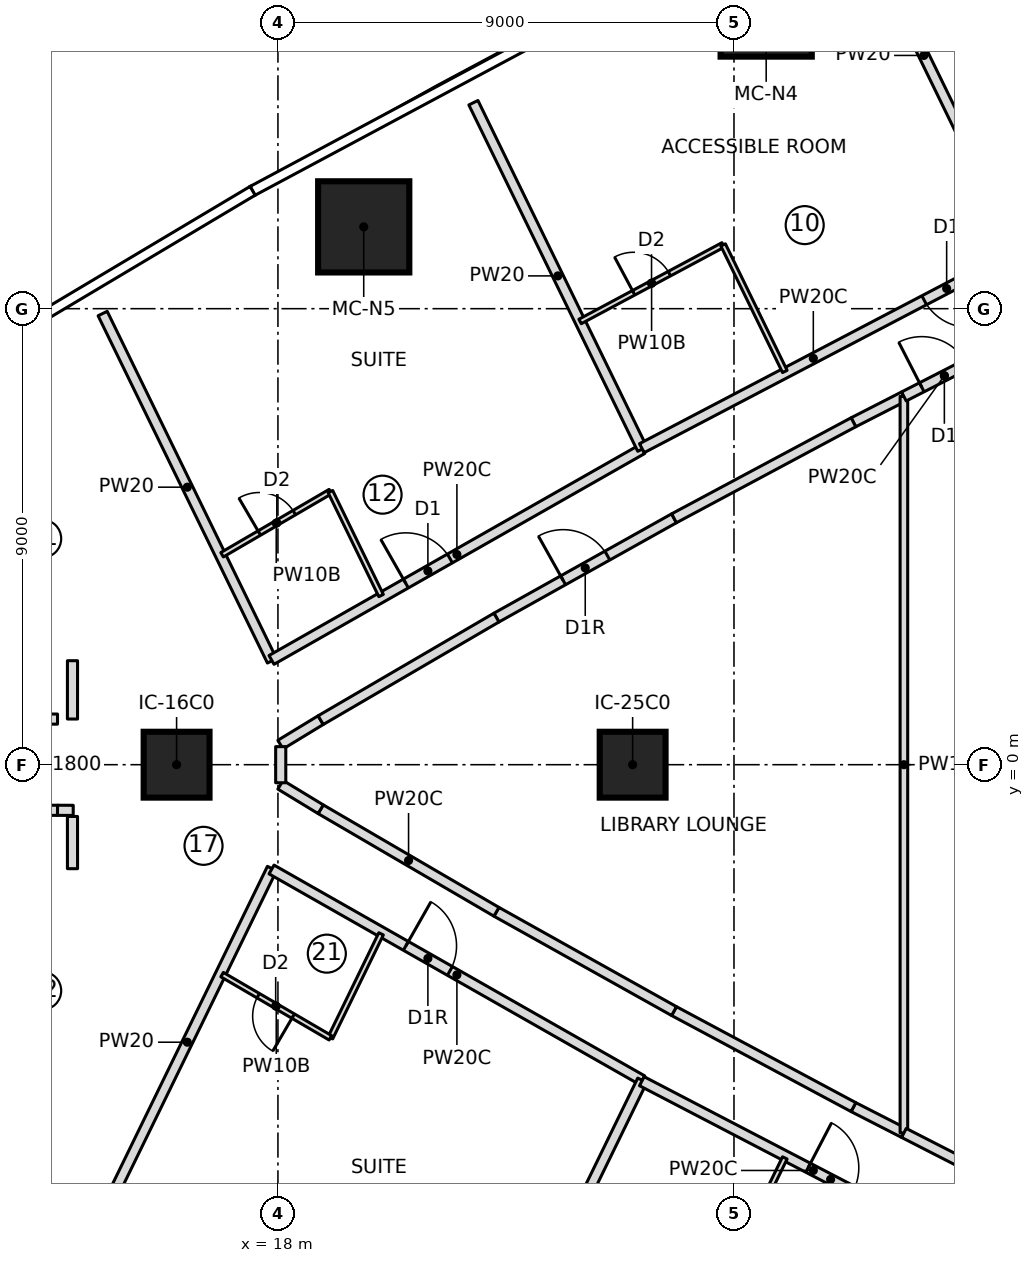
"""IFC4 building model, lengths in metres.
Left out: names, types, materials, properties, quantities, classifications, styles, units other than length and angle.
Written with IfcOpenShell. Run it as: python <this file> out.ifc"""

import sys

from ifc_helpers import new_model, si_unit, direction, frame, frame_2d, origin, origin_2d, place, context, subcontext, project, spatial, rectangle, extrude, element, fill, save


model = new_model("IFC4")
c1 = context("Model", 3, precision=1e-05, world=origin(), true_north=direction((0.0, 1.0)))
c2 = subcontext(c1, "Body", "Model", "MODEL_VIEW")
j1 = project(units=[si_unit("LENGTHUNIT", "METRE"), si_unit("PLANEANGLEUNIT", "RADIAN")], contexts=[c1])
p1 = place(None, origin())
s1 = spatial("IfcSite", under=j1, at=p1, CompositionType="ELEMENT")
p2 = place(p1, origin())
s2 = spatial("IfcBuilding", under=s1, at=p2, CompositionType="ELEMENT")
p3 = place(p2, frame((0.0, 0.0, 53.8)))
s3 = spatial("IfcBuildingStorey", under=s2, at=p3, CompositionType="ELEMENT", Elevation=53.8)
for number, where, z_axis, x_axis in (
    (1, (27.635, 14.874, 0.0), (0.0, 0.0, 1.0), (1.0, 0.0, 0.0)),
    (2, (19.693, 10.615, 0.0), (0.0, 0.0, 1.0), (1.0, 0.0, 0.0)),
):
    element("IfcColumn", number, at=place(p3, frame(where, z_axis=z_axis, x_axis=x_axis)), inside=s3, PredefinedType="COLUMN", context=c2, shape_type="SweptSolid", body=[
        extrude(rectangle(XDim=1.8, YDim=1.8, at=origin_2d()), origin(), (0.0, 0.0, 1.0), 3.55),
    ])
for number, where, z_axis, x_axis in (
    (3, (16.0, 0.0, 0.0), (0.0, 0.0, 1.0), (1.0, 0.0, 0.0)),
    (4, (25.0, 0.0, 0.0), (0.0, 0.0, 1.0), (1.0, 0.0, 0.0)),
):
    element("IfcColumn", number, at=place(p3, frame(where, z_axis=z_axis, x_axis=x_axis)), inside=s3, PredefinedType="COLUMN", context=c2, shape_type="SweptSolid", body=[
        extrude(rectangle(XDim=1.3, YDim=1.3, at=origin_2d()), origin(), (0.0, 0.0, 1.0), 3.55),
    ])
p4 = place(p3, frame((17.882, 2.05, 0.0), z_axis=(0.0, 0.0, 1.0), x_axis=(-0.438213564788, 0.898870887078, 0.0)))
e5 = element("IfcWall", 5, at=p4, inside=s3, PredefinedType="PARTITIONING", context=c2, shape_type="SweptSolid", body=[
    extrude(rectangle(XDim=7.625, YDim=0.2, at=frame_2d((3.813, 0.0))), origin(), (0.0, 0.0, 1.0), 3.25),
])
p5 = place(p3, frame((17.874, 2.068, 0.0), z_axis=(0.0, 0.0, 1.0), x_axis=(0.869280098963, 0.494319845391, 0.0)))
e6 = element("IfcWall", 6, at=p5, inside=s3, PredefinedType="PARTITIONING", context=c2, shape_type="SweptSolid", body=[
    extrude(rectangle(XDim=8.417, YDim=0.2, at=frame_2d((4.208, 0.0))), origin(), (0.0, 0.0, 1.0), 3.25),
])
p6 = place(p5, frame((3.05, 0.0, 0.0)))
e7 = element("IfcOpeningElement", 7, at=p6, cuts=e6, PredefinedType="OPENING", context=c2, shape_type="SweptSolid", body=[
    extrude(rectangle(XDim=1.0, YDim=2.1, at=frame_2d((0.5, 1.05))), frame((0.0, 0.11, 0.0), z_axis=(0.0, -1.0, 0.0), x_axis=(1.0, 0.0, 0.0)), (0.0, 0.0, 1.0), 0.22),
])
p7 = place(p3, frame((16.898, 4.144, 0.0), z_axis=(0.0, 0.0, 1.0), x_axis=(0.863707305865, 0.503993739837, 0.0)))
e8 = element("IfcWall", 8, at=p7, inside=s3, PredefinedType="PARTITIONING", context=c2, shape_type="SweptSolid", body=[
    extrude(rectangle(XDim=2.474, YDim=0.1, at=frame_2d((1.237, 0.0))), origin(), (0.0, 0.0, 1.0), 3.25),
])
p8 = place(p7, frame((0.85, 0.0, 0.0)))
e9 = element("IfcOpeningElement", 9, at=p8, cuts=e8, PredefinedType="OPENING", context=c2, shape_type="SweptSolid", body=[
    extrude(rectangle(XDim=0.8, YDim=2.1, at=frame_2d((0.4, 1.05))), frame((0.0, 0.06, 0.0), z_axis=(0.0, -1.0, 0.0), x_axis=(1.0, 0.0, 0.0)), (0.0, 0.0, 1.0), 0.12),
])
p9 = place(p3, frame((19.035, 5.39, 0.0), z_axis=(0.0, 0.0, 1.0), x_axis=(0.438122322582, -0.898915363344, 0.0)))
e10 = element("IfcWall", 10, at=p9, inside=s3, PredefinedType="PARTITIONING", context=c2, shape_type="SweptSolid", body=[
    extrude(rectangle(XDim=2.283, YDim=0.1, at=frame_2d((1.142, 0.0))), origin(), (0.0, 0.0, 1.0), 3.25),
])
p10 = place(p3, frame((25.19, 6.229, 0.0), z_axis=(0.0, 0.0, 1.0), x_axis=(-0.438202895602, 0.898876088394, 0.0)))
e11 = element("IfcWall", 11, at=p10, inside=s3, PredefinedType="PARTITIONING", context=c2, shape_type="SweptSolid", body=[
    extrude(rectangle(XDim=7.605, YDim=0.2, at=frame_2d((3.803, 0.0))), origin(), (0.0, 0.0, 1.0), 3.25),
])
p11 = place(p3, frame((31.95, 9.792, 0.0), z_axis=(0.0, 0.0, 1.0), x_axis=(-0.88581965272, -0.464029678851, 0.0)))
e12 = element("IfcWall", 12, at=p11, inside=s3, PredefinedType="PARTITIONING", context=c2, shape_type="SweptSolid", body=[
    extrude(rectangle(XDim=7.641, YDim=0.2, at=frame_2d((3.821, 0.0))), origin(), (0.0, 0.0, 1.0), 3.25),
])
p12 = place(p11, frame((0.35, 0.0, 0.0)))
e13 = element("IfcOpeningElement", 13, at=p12, cuts=e12, PredefinedType="OPENING", context=c2, shape_type="SweptSolid", body=[
    extrude(rectangle(XDim=1.0, YDim=2.1, at=frame_2d((0.5, 1.05))), frame((0.0, 0.11, 0.0), z_axis=(0.0, -1.0, 0.0), x_axis=(1.0, 0.0, 0.0)), (0.0, 0.0, 1.0), 0.22),
])
p13 = place(p3, frame((23.962, 8.748, 0.0), z_axis=(0.0, 0.0, 1.0), x_axis=(0.881653338438, 0.471897648672, 0.0)))
e14 = element("IfcWall", 14, at=p13, inside=s3, PredefinedType="PARTITIONING", context=c2, shape_type="SweptSolid", body=[
    extrude(rectangle(XDim=3.202, YDim=0.1, at=frame_2d((1.601, 0.0))), origin(), (0.0, 0.0, 1.0), 3.25),
])
p14 = place(p13, frame((1.2, 0.0, 0.0)))
e15 = element("IfcOpeningElement", 15, at=p14, cuts=e14, PredefinedType="OPENING", context=c2, shape_type="SweptSolid", body=[
    extrude(rectangle(XDim=0.8, YDim=2.1, at=frame_2d((0.4, 1.05))), frame((0.0, 0.06, 0.0), z_axis=(0.0, -1.0, 0.0), x_axis=(1.0, 0.0, 0.0)), (0.0, 0.0, 1.0), 0.12),
])
p15 = place(p3, frame((26.786, 10.259, 0.0), z_axis=(0.0, 0.0, 1.0), x_axis=(0.43822975423, -0.898862994292, 0.0)))
e16 = element("IfcWall", 16, at=p15, inside=s3, PredefinedType="PARTITIONING", context=c2, shape_type="SweptSolid", body=[
    extrude(rectangle(XDim=2.779, YDim=0.1, at=frame_2d((1.389, 0.0))), origin(), (0.0, 0.0, 1.0), 3.25),
])
p16 = place(p3, frame((32.185, 11.05, 0.0), z_axis=(0.0, 0.0, 1.0), x_axis=(-0.438228560869, 0.898863576099, 0.0)))
e17 = element("IfcWall", 17, at=p16, inside=s3, PredefinedType="PARTITIONING", context=c2, shape_type="SweptSolid", body=[
    extrude(rectangle(XDim=6.559, YDim=0.2, at=frame_2d((3.28, 0.0))), origin(), (0.0, 0.0, 1.0), 3.25),
])
p17 = place(p3, frame((14.541, -8.904, 0.0), z_axis=(0.0, 0.0, 1.0), x_axis=(0.438213564788, 0.898870887078, 0.0)))
e18 = element("IfcWall", 18, at=p17, inside=s3, PredefinedType="PARTITIONING", context=c2, shape_type="SweptSolid", body=[
    extrude(rectangle(XDim=7.625, YDim=0.2, at=frame_2d((3.813, 0.0))), origin(), (0.0, 0.0, 1.0), 3.25),
])
p18 = place(p3, frame((17.874, -2.068, 0.0), z_axis=(0.0, 0.0, 1.0), x_axis=(0.869280098963, -0.494319845391, 0.0)))
e19 = element("IfcWall", 19, at=p18, inside=s3, PredefinedType="PARTITIONING", context=c2, shape_type="SweptSolid", body=[
    extrude(rectangle(XDim=8.417, YDim=0.2, at=frame_2d((4.208, 0.0))), origin(), (0.0, 0.0, 1.0), 3.25),
])
p19 = place(p18, frame((3.05, 0.0, 0.0)))
e20 = element("IfcOpeningElement", 20, at=p19, cuts=e19, PredefinedType="OPENING", context=c2, shape_type="SweptSolid", body=[
    extrude(rectangle(XDim=1.0, YDim=2.1, at=frame_2d((0.5, 1.05))), frame((0.0, 0.11, 0.0), z_axis=(0.0, -1.0, 0.0), x_axis=(1.0, 0.0, 0.0)), (0.0, 0.0, 1.0), 0.22),
])
p20 = place(p3, frame((20.035, -3.338, 0.0), z_axis=(0.0, 0.0, 1.0), x_axis=(-0.438122322582, -0.898915363344, 0.0)))
e21 = element("IfcWall", 21, at=p20, inside=s3, PredefinedType="PARTITIONING", context=c2, shape_type="SweptSolid", body=[
    extrude(rectangle(XDim=2.283, YDim=0.1, at=frame_2d((1.142, 0.0))), origin(), (0.0, 0.0, 1.0), 3.25),
])
p21 = place(p3, frame((19.035, -5.39, 0.0), z_axis=(0.0, 0.0, 1.0), x_axis=(-0.863707305865, 0.503993739837, 0.0)))
e22 = element("IfcWall", 22, at=p21, inside=s3, PredefinedType="PARTITIONING", context=c2, shape_type="SweptSolid", body=[
    extrude(rectangle(XDim=2.474, YDim=0.1, at=frame_2d((1.237, 0.0))), origin(), (0.0, 0.0, 1.0), 3.25),
])
p22 = place(p21, frame((0.85, 0.0, 0.0)))
e23 = element("IfcOpeningElement", 23, at=p22, cuts=e22, PredefinedType="OPENING", context=c2, shape_type="SweptSolid", body=[
    extrude(rectangle(XDim=0.8, YDim=2.1, at=frame_2d((0.4, 1.05))), frame((0.0, 0.06, 0.0), z_axis=(0.0, -1.0, 0.0), x_axis=(1.0, 0.0, 0.0)), (0.0, 0.0, 1.0), 0.12),
])
p23 = place(p3, frame((21.857, -13.065, 0.0), z_axis=(0.0, 0.0, 1.0), x_axis=(0.438202895602, 0.898876088394, 0.0)))
e24 = element("IfcWall", 24, at=p23, inside=s3, PredefinedType="PARTITIONING", context=c2, shape_type="SweptSolid", body=[
    extrude(rectangle(XDim=7.605, YDim=0.2, at=frame_2d((3.803, 0.0))), origin(), (0.0, 0.0, 1.0), 3.25),
])
p24 = place(p3, frame((25.181, -6.247, 0.0), z_axis=(0.0, 0.0, 1.0), x_axis=(0.887026569793, -0.461718382221, 0.0)))
e25 = element("IfcWall", 25, at=p24, inside=s3, PredefinedType="PARTITIONING", context=c2, shape_type="SweptSolid", body=[
    extrude(rectangle(XDim=7.631, YDim=0.2, at=frame_2d((3.815, 0.0))), origin(), (0.0, 0.0, 1.0), 3.25),
])
p25 = place(p24, frame((3.7, 0.0, 0.0)))
e26 = element("IfcOpeningElement", 26, at=p25, cuts=e25, PredefinedType="OPENING", context=c2, shape_type="SweptSolid", body=[
    extrude(rectangle(XDim=1.0, YDim=2.1, at=frame_2d((0.5, 1.05))), frame((0.0, 0.11, 0.0), z_axis=(0.0, -1.0, 0.0), x_axis=(1.0, 0.0, 0.0)), (0.0, 0.0, 1.0), 0.22),
])
p26 = place(p3, frame((28.003, -7.761, 0.0), z_axis=(0.0, 0.0, 1.0), x_axis=(-0.43822975423, -0.898862994292, 0.0)))
e27 = element("IfcWall", 27, at=p26, inside=s3, PredefinedType="PARTITIONING", context=c2, shape_type="SweptSolid", body=[
    extrude(rectangle(XDim=2.779, YDim=0.1, at=frame_2d((1.389, 0.0))), origin(), (0.0, 0.0, 1.0), 3.25),
])
p27 = place(p3, frame((22.312, 2.903, 0.0), z_axis=(0.0, 0.0, 1.0), x_axis=(0.872800289292, 0.488077509225, 0.0)))
e28 = element("IfcWall", 28, at=p27, inside=s3, PredefinedType="PARTITIONING", context=c2, shape_type="SweptSolid", body=[
    extrude(rectangle(XDim=4.016, YDim=0.2, at=frame_2d((2.008, 0.0))), origin(), (0.0, 0.0, 1.0), 3.25),
])
p28 = place(p27, frame((1.508, 0.0, 0.0)))
e29 = element("IfcOpeningElement", 29, at=p28, cuts=e28, PredefinedType="OPENING", context=c2, shape_type="SweptSolid", body=[
    extrude(rectangle(XDim=1.0, YDim=2.1, at=frame_2d((0.5, 1.05))), frame((0.0, 0.11, 0.0), z_axis=(0.0, -1.0, 0.0), x_axis=(1.0, 0.0, 0.0)), (0.0, 0.0, 1.0), 0.22),
])
for number, where, z_axis, x_axis in (
    (30, (29.357, 6.758, 0.0), (0.0, 0.0, 1.0), (0.89, 0.455, 0.0)),
    (31, (30.353, -7.268, 0.0), (0.0, 0.0, 1.0), (-0.89, 0.455, 0.0)),
):
    element("IfcWall", number, at=place(p3, frame(where, z_axis=z_axis, x_axis=x_axis)), inside=s3, PredefinedType="PARTITIONING", context=c2, shape_type="SweptSolid", body=[
        extrude(rectangle(XDim=1.119, YDim=0.2, at=frame_2d((0.559, 0.0))), origin(), (0.0, 0.0, 1.0), 3.25),
    ])
p29 = place(p3, frame((29.357, -6.758, 0.0), z_axis=(0.0, 0.0, 1.0), x_axis=(-0.881655245922, 0.471894084874, 0.0)))
e32 = element("IfcWall", 32, at=p29, inside=s3, PredefinedType="PARTITIONING", context=c2, shape_type="SweptSolid", body=[
    extrude(rectangle(XDim=4.016, YDim=0.2, at=frame_2d((2.008, 0.0))), origin(), (0.0, 0.0, 1.0), 3.25),
])
p30 = place(p3, frame((25.817, -4.863, 0.0), z_axis=(0.0, 0.0, 1.0), x_axis=(-0.872800289292, 0.488077509225, 0.0)))
e33 = element("IfcWall", 33, at=p30, inside=s3, PredefinedType="PARTITIONING", context=c2, shape_type="SweptSolid", body=[
    extrude(rectangle(XDim=4.016, YDim=0.2, at=frame_2d((2.008, 0.0))), origin(), (0.0, 0.0, 1.0), 3.25),
])
p31 = place(p3, frame((22.312, -2.903, 0.0), z_axis=(0.0, 0.0, 1.0), x_axis=(-0.863710538269, 0.503988200341, 0.0)))
e34 = element("IfcWall", 34, at=p31, inside=s3, PredefinedType="PARTITIONING", context=c2, shape_type="SweptSolid", body=[
    extrude(rectangle(XDim=4.016, YDim=0.2, at=frame_2d((2.008, 0.0))), origin(), (0.0, 0.0, 1.0), 3.25),
])
for number, where, z_axis, x_axis in (
    (35, (18.844, -0.879, 0.0), (0.0, 0.0, 1.0), (-0.854, 0.52, 0.0)),
    (36, (18.05, 0.396, 0.0), (0.0, 0.0, 1.0), (0.854, 0.52, 0.0)),
):
    element("IfcWall", number, at=place(p3, frame(where, z_axis=z_axis, x_axis=x_axis)), inside=s3, PredefinedType="PARTITIONING", context=c2, shape_type="SweptSolid", body=[
        extrude(rectangle(XDim=0.929, YDim=0.2, at=frame_2d((0.464, 0.0))), origin(), (0.0, 0.0, 1.0), 3.25),
    ])
for number, where, z_axis, x_axis in (
    (37, (18.844, 0.879, 0.0), (0.0, 0.0, 1.0), (0.864, 0.504, 0.0)),
    (38, (25.817, 4.863, 0.0), (0.0, 0.0, 1.0), (0.882, 0.472, 0.0)),
):
    element("IfcWall", number, at=place(p3, frame(where, z_axis=z_axis, x_axis=x_axis)), inside=s3, PredefinedType="PARTITIONING", context=c2, shape_type="SweptSolid", body=[
        extrude(rectangle(XDim=4.016, YDim=0.2, at=frame_2d((2.008, 0.0))), origin(), (0.0, 0.0, 1.0), 3.25),
    ])
p32 = place(p3, frame((30.353, -7.268, 0.0), z_axis=(0.0, 0.0, 1.0), x_axis=(0.0, 1.0, 0.0)))
e39 = element("IfcWall", 39, at=p32, inside=s3, PredefinedType="PARTITIONING", context=c2, shape_type="SweptSolid", body=[
    extrude(rectangle(XDim=14.535, YDim=0.15, at=frame_2d((7.268, 0.0))), origin(), (0.0, 0.0, 1.0), 3.25),
])
p33 = place(p3, frame((30.353, 7.268, 0.0), z_axis=(0.0, 0.0, 1.0), x_axis=(0.890195531144, 0.455578660969, 0.0)))
e40 = element("IfcWall", 40, at=p33, inside=s3, PredefinedType="PARTITIONING", context=c2, shape_type="SweptSolid", body=[
    extrude(rectangle(XDim=1.794, YDim=0.2, at=frame_2d((0.897, 0.0))), origin(), (0.0, 0.0, 1.0), 3.25),
])
p34 = place(p33, frame((0.397, 0.0, 0.0)))
e41 = element("IfcOpeningElement", 41, at=p34, cuts=e40, PredefinedType="OPENING", context=c2, shape_type="SweptSolid", body=[
    extrude(rectangle(XDim=1.0, YDim=2.1, at=frame_2d((0.5, 1.05))), frame((0.0, 0.11, 0.0), z_axis=(0.0, -1.0, 0.0), x_axis=(1.0, 0.0, 0.0)), (0.0, 0.0, 1.0), 0.22),
])
p35 = place(p3, frame((31.95, -8.085, 0.0), z_axis=(0.0, 0.0, 1.0), x_axis=(-0.890195531144, 0.455578660969, 0.0)))
e42 = element("IfcWall", 42, at=p35, inside=s3, PredefinedType="PARTITIONING", context=c2, shape_type="SweptSolid", body=[
    extrude(rectangle(XDim=1.794, YDim=0.2, at=frame_2d((0.897, 0.0))), origin(), (0.0, 0.0, 1.0), 3.25),
])
p36 = place(p3, frame((11.327, 0.9, 0.0), z_axis=(0.0, 0.0, 1.0), x_axis=(1.0, 0.0, 0.0)))
e43 = element("IfcWall", 43, at=p36, inside=s3, PredefinedType="PARTITIONING", context=c2, shape_type="SweptSolid", body=[
    extrude(rectangle(XDim=2.323, YDim=0.2, at=frame_2d((1.161, 0.0))), origin(), (0.0, 0.0, 1.0), 3.25),
])
p37 = place(p36, frame((0.995, 0.0, 0.0)))
e44 = element("IfcOpeningElement", 44, at=p37, cuts=e43, PredefinedType="OPENING", context=c2, shape_type="SweptSolid", body=[
    extrude(rectangle(XDim=1.0, YDim=2.1, at=frame_2d((0.5, 1.05))), frame((0.0, 0.11, 0.0), z_axis=(0.0, -1.0, 0.0), x_axis=(1.0, 0.0, 0.0)), (0.0, 0.0, 1.0), 0.22),
])
p38 = place(p3, frame((11.327, -0.9, 0.0), z_axis=(0.0, 0.0, 1.0), x_axis=(1.0, 0.0, 0.0)))
e45 = element("IfcWall", 45, at=p38, inside=s3, PredefinedType="PARTITIONING", context=c2, shape_type="SweptSolid", body=[
    extrude(rectangle(XDim=2.323, YDim=0.2, at=frame_2d((1.161, 0.0))), origin(), (0.0, 0.0, 1.0), 3.25),
])
p39 = place(p38, frame((0.995, 0.0, 0.0)))
e46 = element("IfcOpeningElement", 46, at=p39, cuts=e45, PredefinedType="OPENING", context=c2, shape_type="SweptSolid", body=[
    extrude(rectangle(XDim=1.0, YDim=2.1, at=frame_2d((0.5, 1.05))), frame((0.0, 0.11, 0.0), z_axis=(0.0, -1.0, 0.0), x_axis=(1.0, 0.0, 0.0)), (0.0, 0.0, 1.0), 0.22),
])
p40 = place(p3, frame((18.055, -0.357, 0.0), z_axis=(0.0, 0.0, 1.0), x_axis=(0.0, 1.0, 0.0)))
e47 = element("IfcWall", 47, at=p40, inside=s3, PredefinedType="PARTITIONING", context=c2, shape_type="SweptSolid", body=[
    extrude(rectangle(XDim=0.713, YDim=0.2, at=frame_2d((0.357, 0.0))), origin(), (0.0, 0.0, 1.0), 3.25),
])
p41 = place(p3, frame((13.946, 2.052, 0.0), z_axis=(0.0, 0.0, 1.0), x_axis=(-0.000424178117, -0.999999910036, 0.0)))
e48 = element("IfcWall", 48, at=p41, inside=s3, PredefinedType="PARTITIONING", context=c2, shape_type="SweptSolid", body=[
    extrude(rectangle(XDim=1.151, YDim=0.2, at=frame_2d((0.576, 0.0))), origin(), (0.0, 0.0, 1.0), 3.25),
])
p42 = place(p3, frame((13.65, -0.9, 0.0), z_axis=(0.0, 0.0, 1.0), x_axis=(0.999984810316, -0.005511727301, 0.0)))
e49 = element("IfcWall", 49, at=p42, inside=s3, PredefinedType="PARTITIONING", context=c2, shape_type="SweptSolid", body=[
    extrude(rectangle(XDim=0.31, YDim=0.2, at=frame_2d((0.155, 0.0))), origin(), (0.0, 0.0, 1.0), 3.25),
])
p43 = place(p3, frame((13.945, -1.021, 0.0), z_axis=(0.0, 0.0, 1.0), x_axis=(0.000473596916, -0.999999887853, 0.0)))
e50 = element("IfcWall", 50, at=p43, inside=s3, PredefinedType="PARTITIONING", context=c2, shape_type="SweptSolid", body=[
    extrude(rectangle(XDim=1.031, YDim=0.2, at=frame_2d((0.516, 0.0))), origin(), (0.0, 0.0, 1.0), 3.25),
])
p44 = place(p8, origin())
e51 = element("IfcDoor", 51, at=p44, inside=s3, OperationType="SINGLE_SWING_LEFT", PredefinedType="DOOR", context=c2, shape_type="SweptSolid", body=[
    extrude(rectangle(XDim=0.8, YDim=2.1, at=frame_2d((0.4, 1.05))), frame((0.0, 0.025, 0.0), z_axis=(0.0, -1.0, 0.0), x_axis=(1.0, 0.0, 0.0)), (0.0, 0.0, 1.0), 0.05),
])
fill(e9, e51)
p45 = place(p6, origin())
e52 = element("IfcDoor", 52, at=p45, inside=s3, OperationType="SINGLE_SWING_LEFT", PredefinedType="DOOR", context=c2, shape_type="SweptSolid", body=[
    extrude(rectangle(XDim=1.0, YDim=2.1, at=frame_2d((0.5, 1.05))), frame((0.0, 0.025, 0.0), z_axis=(0.0, -1.0, 0.0), x_axis=(1.0, 0.0, 0.0)), (0.0, 0.0, 1.0), 0.05),
])
fill(e7, e52)
p46 = place(p14, origin())
e53 = element("IfcDoor", 53, at=p46, inside=s3, OperationType="SINGLE_SWING_LEFT", PredefinedType="DOOR", context=c2, shape_type="SweptSolid", body=[
    extrude(rectangle(XDim=0.8, YDim=2.1, at=frame_2d((0.4, 1.05))), frame((0.0, 0.025, 0.0), z_axis=(0.0, -1.0, 0.0), x_axis=(1.0, 0.0, 0.0)), (0.0, 0.0, 1.0), 0.05),
])
fill(e15, e53)
p47 = place(p12, origin())
e54 = element("IfcDoor", 54, at=p47, inside=s3, OperationType="SINGLE_SWING_LEFT", PredefinedType="DOOR", context=c2, shape_type="SweptSolid", body=[
    extrude(rectangle(XDim=1.0, YDim=2.1, at=frame_2d((0.5, 1.05))), frame((0.0, 0.025, 0.0), z_axis=(0.0, -1.0, 0.0), x_axis=(1.0, 0.0, 0.0)), (0.0, 0.0, 1.0), 0.05),
])
fill(e13, e54)
p48 = place(p22, origin())
e55 = element("IfcDoor", 55, at=p48, inside=s3, OperationType="SINGLE_SWING_LEFT", PredefinedType="DOOR", context=c2, shape_type="SweptSolid", body=[
    extrude(rectangle(XDim=0.8, YDim=2.1, at=frame_2d((0.4, 1.05))), frame((0.0, 0.025, 0.0), z_axis=(0.0, -1.0, 0.0), x_axis=(1.0, 0.0, 0.0)), (0.0, 0.0, 1.0), 0.05),
])
fill(e23, e55)
p49 = place(p19, origin())
e56 = element("IfcDoor", 56, at=p49, inside=s3, OperationType="SINGLE_SWING_RIGHT", PredefinedType="DOOR", context=c2, shape_type="SweptSolid", body=[
    extrude(rectangle(XDim=1.0, YDim=2.1, at=frame_2d((0.5, 1.05))), frame((0.0, 0.025, 0.0), z_axis=(0.0, -1.0, 0.0), x_axis=(1.0, 0.0, 0.0)), (0.0, 0.0, 1.0), 0.05),
])
fill(e20, e56)
p50 = place(p25, origin())
e57 = element("IfcDoor", 57, at=p50, inside=s3, OperationType="SINGLE_SWING_RIGHT", PredefinedType="DOOR", context=c2, shape_type="SweptSolid", body=[
    extrude(rectangle(XDim=1.0, YDim=2.1, at=frame_2d((0.5, 1.05))), frame((0.0, 0.025, 0.0), z_axis=(0.0, -1.0, 0.0), x_axis=(1.0, 0.0, 0.0)), (0.0, 0.0, 1.0), 0.05),
])
fill(e26, e57)
p51 = place(p28, origin())
e58 = element("IfcDoor", 58, at=p51, inside=s3, OperationType="SINGLE_SWING_RIGHT", PredefinedType="DOOR", context=c2, shape_type="SweptSolid", body=[
    extrude(rectangle(XDim=1.0, YDim=2.1, at=frame_2d((0.5, 1.05))), frame((0.0, 0.025, 0.0), z_axis=(0.0, -1.0, 0.0), x_axis=(1.0, 0.0, 0.0)), (0.0, 0.0, 1.0), 0.05),
])
fill(e29, e58)
p52 = place(p34, origin())
e59 = element("IfcDoor", 59, at=p52, inside=s3, OperationType="SINGLE_SWING_LEFT", PredefinedType="DOOR", context=c2, shape_type="SweptSolid", body=[
    extrude(rectangle(XDim=1.0, YDim=2.1, at=frame_2d((0.5, 1.05))), frame((0.0, 0.025, 0.0), z_axis=(0.0, -1.0, 0.0), x_axis=(1.0, 0.0, 0.0)), (0.0, 0.0, 1.0), 0.05),
])
fill(e41, e59)
save(model, sys.argv[1])
